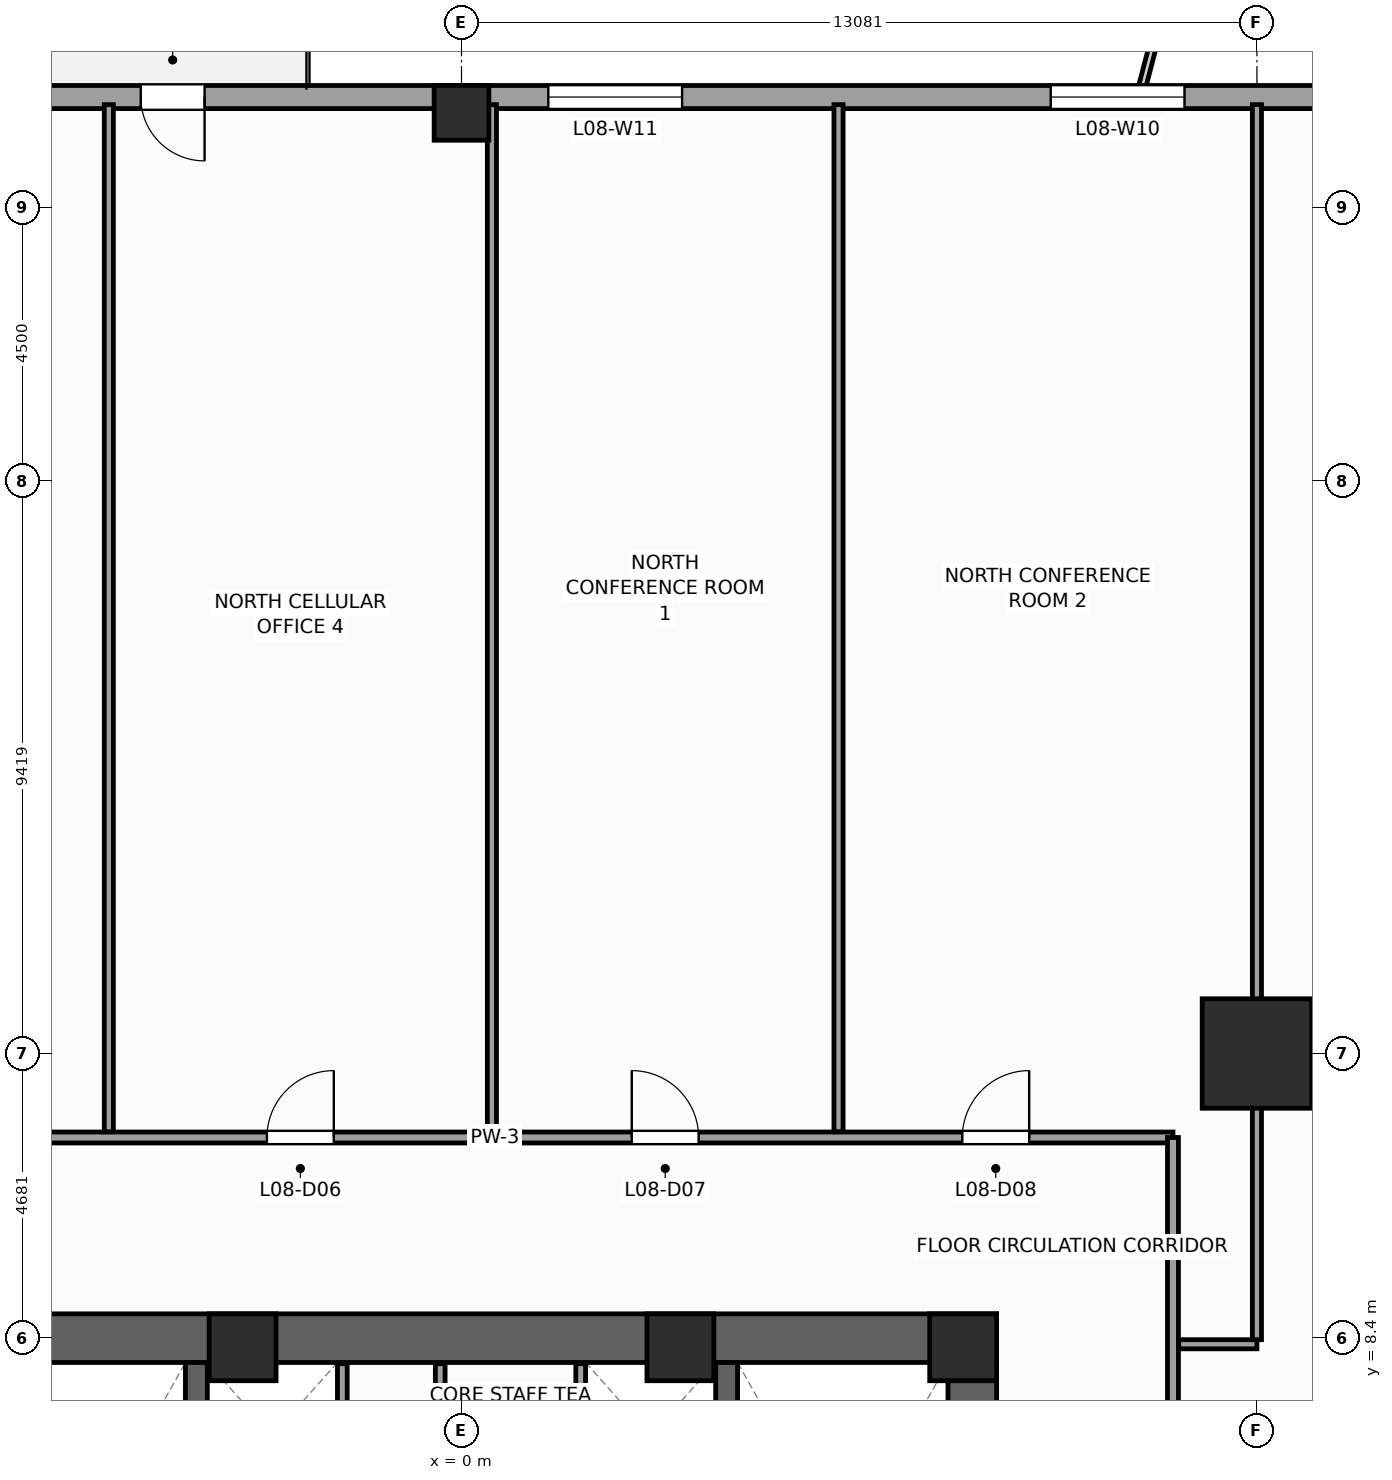
"""IFC4 building model, lengths in metres.
Left out: names, types, materials, properties, quantities, classifications, styles, units other than length and angle.
Written with IfcOpenShell. Run it as: python <this file> out.ifc"""

import sys

from ifc_helpers import new_model, si_unit, direction, frame, frame_2d, origin, origin_2d, place, context, subcontext, project, spatial, rectangle, extrude, source, transform, mapped, element, fill, save


model = new_model("IFC4")
c1 = context("Model", 3, precision=1e-05, world=origin(), true_north=direction((0.0, 1.0)))
c2 = subcontext(c1, "Body", "Model", "MODEL_VIEW")
j1 = project(units=[si_unit("LENGTHUNIT", "METRE"), si_unit("PLANEANGLEUNIT", "RADIAN")], contexts=[c1])
p1 = place(None, origin())
s1 = spatial("IfcSite", under=j1, at=p1, CompositionType="ELEMENT")
p2 = place(p1, origin())
s2 = spatial("IfcBuilding", under=s1, at=p2, CompositionType="ELEMENT")
p3 = place(p2, frame((0.0, 0.0, 38.0)))
s3 = spatial("IfcBuildingStorey", under=s2, at=p3, CompositionType="ELEMENT", Elevation=38.0)
p4 = place(p3, frame((-8.8, 8.4, 0.0), z_axis=(0.0, 0.0, 1.0), x_axis=(1.0, 0.0, 0.0)))
e1 = element("IfcWall", 1, at=p4, inside=s3, PredefinedType="SHEAR", context=c2, shape_type="SweptSolid", body=[
    extrude(rectangle(XDim=17.6, YDim=0.8, at=frame_2d((8.8, 0.0))), origin(), (0.0, 0.0, 1.0), 4.0),
])
p5 = place(p3, frame((8.4, -8.0, 0.0), z_axis=(0.0, 0.0, 1.0), x_axis=(0.0, 1.0, 0.0)))
e2 = element("IfcWall", 2, at=p5, inside=s3, PredefinedType="SHEAR", context=c2, shape_type="SweptSolid", body=[
    extrude(rectangle(XDim=16.0, YDim=0.8, at=frame_2d((8.0, 0.0))), origin(), (0.0, 0.0, 1.0), 4.0),
])
p6 = place(p5, frame((4.69, 0.0, 0.0)))
e3 = element("IfcOpeningElement", 3, at=p6, cuts=e2, PredefinedType="OPENING", context=c2, shape_type="SweptSolid", body=[
    extrude(rectangle(XDim=1.3, YDim=2.2, at=frame_2d((0.65, 1.1))), frame((0.0, 0.41, 0.0), z_axis=(0.0, -1.0, 0.0), x_axis=(1.0, 0.0, 0.0)), (0.0, 0.0, 1.0), 0.82),
])
for number, where, z_axis, x_axis in (
    (4, (-4.36, -8.0, 0.0), (0.0, 0.0, 1.0), (0.0, 1.0, 0.0)),
    (5, (4.36, -8.0, 0.0), (0.0, 0.0, 1.0), (0.0, 1.0, 0.0)),
):
    element("IfcWall", number, at=place(p3, frame(where, z_axis=z_axis, x_axis=x_axis)), inside=s3, PredefinedType="SHEAR", context=c2, shape_type="SweptSolid", body=[
        extrude(rectangle(XDim=16.0, YDim=0.36, at=frame_2d((8.0, 0.0))), origin(), (0.0, 0.0, 1.0), 4.0),
    ])
m1 = source(origin(), c2, "Body", "SweptSolid", [
    extrude(rectangle(XDim=1.1, YDim=1.1, at=origin_2d()), origin(), (0.0, 0.0, 1.0), 4.0),
])
for number, where, z_axis, x_axis in (
    (6, (8.25, 8.25, 0.0), (0.0, 0.0, 1.0), (1.0, 0.0, 0.0)),
    (7, (-3.6, 8.25, 0.0), (0.0, 0.0, 1.0), (1.0, 0.0, 0.0)),
    (8, (3.6, 8.25, 0.0), (0.0, 0.0, 1.0), (1.0, 0.0, 0.0)),
):
    element("IfcColumn", number, at=place(p3, frame(where, z_axis=z_axis, x_axis=x_axis)), inside=s3, PredefinedType="PILASTER", context=c2, shape_type="MappedRepresentation", body=[
        mapped(m1, transform((0.0, 0.0, 0.0), scale=1.0)),
    ])
m2 = source(origin(), c2, "Body", "SweptSolid", [
    extrude(rectangle(XDim=1.8, YDim=1.8, at=origin_2d()), origin(), (0.0, 0.0, 1.0), 4.0),
])
p7 = place(p3, frame((13.081, 13.081, 0.0), z_axis=(0.0, 0.0, 1.0), x_axis=(1.0, 0.0, 0.0)))
e9 = element("IfcColumn", 9, at=p7, inside=s3, PredefinedType="COLUMN", context=c2, shape_type="MappedRepresentation", body=[
    mapped(m2, transform((0.0, 0.0, 0.0), scale=1.0)),
])
m3 = source(origin(), c2, "Body", "SweptSolid", [
    extrude(rectangle(XDim=0.9, YDim=0.9, at=origin_2d()), origin(), (0.0, 0.0, 1.0), 4.0),
])
p8 = place(p3, frame((0.0, 28.55, 0.0), z_axis=(0.0, 0.0, 1.0), x_axis=(1.0, 0.0, 0.0)))
e10 = element("IfcColumn", 10, at=p8, inside=s3, PredefinedType="COLUMN", context=c2, shape_type="MappedRepresentation", body=[
    mapped(m3, transform((0.0, 0.0, 0.0), scale=1.0)),
])
p9 = place(p3, frame((25.69, 28.81, 0.0), z_axis=(0.0, 0.0, 1.0), x_axis=(-1.0, 0.0, 0.0)))
e11 = element("IfcWall", 11, at=p9, inside=s3, PredefinedType="STANDARD", context=c2, shape_type="SweptSolid", body=[
    extrude(rectangle(XDim=51.38, YDim=0.38, at=frame_2d((25.69, 0.0))), origin(), (0.0, 0.0, 1.0), 3.12),
])
p10 = place(p9, frame((29.915, 0.0, 0.0)))
e12 = element("IfcOpeningElement", 12, at=p10, cuts=e11, PredefinedType="OPENING", context=c2, shape_type="SweptSolid", body=[
    extrude(rectangle(XDim=1.05, YDim=2.25, at=frame_2d((0.525, 1.125))), frame((0.0, 0.2, 0.0), z_axis=(0.0, -1.0, 0.0), x_axis=(1.0, 0.0, 0.0)), (0.0, 0.0, 1.0), 0.4),
])
p11 = place(p9, frame((5.466, 0.0, 0.49)))
e13 = element("IfcOpeningElement", 13, at=p11, cuts=e11, PredefinedType="OPENING", context=c2, shape_type="SweptSolid", body=[
    extrude(rectangle(XDim=1.4, YDim=2.4, at=frame_2d((0.7, 1.2))), frame((0.0, 0.2, 0.0), z_axis=(0.0, -1.0, 0.0), x_axis=(1.0, 0.0, 0.0)), (0.0, 0.0, 1.0), 0.4),
])
p12 = place(p9, frame((13.8, 0.0, 0.49)))
e14 = element("IfcOpeningElement", 14, at=p12, cuts=e11, PredefinedType="OPENING", context=c2, shape_type="SweptSolid", body=[
    extrude(rectangle(XDim=2.2, YDim=2.4, at=frame_2d((1.1, 1.2))), frame((0.0, 0.2, 0.0), z_axis=(0.0, -1.0, 0.0), x_axis=(1.0, 0.0, 0.0)), (0.0, 0.0, 1.0), 0.4),
])
p13 = place(p9, frame((22.062, 0.0, 0.49)))
e15 = element("IfcOpeningElement", 15, at=p13, cuts=e11, PredefinedType="OPENING", context=c2, shape_type="SweptSolid", body=[
    extrude(rectangle(XDim=2.2, YDim=2.4, at=frame_2d((1.1, 1.2))), frame((0.0, 0.2, 0.0), z_axis=(0.0, -1.0, 0.0), x_axis=(1.0, 0.0, 0.0)), (0.0, 0.0, 1.0), 0.4),
])
p14 = place(p9, frame((33.838, 0.0, 0.49)))
e16 = element("IfcOpeningElement", 16, at=p14, cuts=e11, PredefinedType="OPENING", context=c2, shape_type="SweptSolid", body=[
    extrude(rectangle(XDim=2.2, YDim=2.4, at=frame_2d((1.1, 1.2))), frame((0.0, 0.2, 0.0), z_axis=(0.0, -1.0, 0.0), x_axis=(1.0, 0.0, 0.0)), (0.0, 0.0, 1.0), 0.4),
])
p15 = place(p9, frame((43.487, 0.0, 0.49)))
e17 = element("IfcOpeningElement", 17, at=p15, cuts=e11, PredefinedType="OPENING", context=c2, shape_type="SweptSolid", body=[
    extrude(rectangle(XDim=1.4, YDim=2.4, at=frame_2d((0.7, 1.2))), frame((0.0, 0.2, 0.0), z_axis=(0.0, -1.0, 0.0), x_axis=(1.0, 0.0, 0.0)), (0.0, 0.0, 1.0), 0.4),
])
for number, where, z_axis, x_axis in (
    (18, (-1.96, 4.58, 0.0), (0.0, 0.0, 1.0), (0.0, 1.0, 0.0)),
    (19, (1.96, 4.58, 0.0), (0.0, 0.0, 1.0), (0.0, 1.0, 0.0)),
):
    element("IfcWall", number, at=place(p3, frame(where, z_axis=z_axis, x_axis=x_axis)), inside=s3, PredefinedType="PARTITIONING", context=c2, shape_type="SweptSolid", body=[
        extrude(rectangle(XDim=3.4, YDim=0.16, at=frame_2d((1.7, 0.0))), origin(), (0.0, 0.0, 1.0), 3.72),
    ])
p16 = place(p3, frame((-0.35, 4.6, 0.0), z_axis=(0.0, 0.0, 1.0), x_axis=(0.0, 1.0, 0.0)))
e20 = element("IfcWall", 20, at=p16, inside=s3, PredefinedType="PARTITIONING", context=c2, shape_type="SweptSolid", body=[
    extrude(rectangle(XDim=3.38, YDim=0.16, at=frame_2d((1.69, 0.0))), origin(), (0.0, 0.0, 1.0), 3.72),
])
p17 = place(p3, frame((-10.6, 11.7, 0.0), z_axis=(0.0, 0.0, 1.0), x_axis=(1.0, 0.0, 0.0)))
e21 = element("IfcWall", 21, at=p17, inside=s3, PredefinedType="PARTITIONING", context=c2, shape_type="SweptSolid", body=[
    extrude(rectangle(XDim=22.3, YDim=0.18, at=frame_2d((11.15, 0.0))), origin(), (0.0, 0.0, 1.0), 3.72),
])
p18 = place(p17, frame((2.014, 0.0, 0.0)))
e22 = element("IfcOpeningElement", 22, at=p18, cuts=e21, PredefinedType="OPENING", context=c2, shape_type="SweptSolid", body=[
    extrude(rectangle(XDim=1.1, YDim=2.2, at=frame_2d((0.55, 1.1))), frame((0.0, 0.1, 0.0), z_axis=(0.0, -1.0, 0.0), x_axis=(1.0, 0.0, 0.0)), (0.0, 0.0, 1.0), 0.2),
])
p19 = place(p17, frame((7.4, 0.0, 0.0)))
e23 = element("IfcOpeningElement", 23, at=p19, cuts=e21, PredefinedType="OPENING", context=c2, shape_type="SweptSolid", body=[
    extrude(rectangle(XDim=1.1, YDim=2.2, at=frame_2d((0.55, 1.1))), frame((0.0, 0.1, 0.0), z_axis=(0.0, -1.0, 0.0), x_axis=(1.0, 0.0, 0.0)), (0.0, 0.0, 1.0), 0.2),
])
p20 = place(p17, frame((13.4, 0.0, 0.0)))
e24 = element("IfcOpeningElement", 24, at=p20, cuts=e21, PredefinedType="OPENING", context=c2, shape_type="SweptSolid", body=[
    extrude(rectangle(XDim=1.1, YDim=2.2, at=frame_2d((0.55, 1.1))), frame((0.0, 0.1, 0.0), z_axis=(0.0, -1.0, 0.0), x_axis=(1.0, 0.0, 0.0)), (0.0, 0.0, 1.0), 0.2),
])
p21 = place(p17, frame((18.835, 0.0, 0.0)))
e25 = element("IfcOpeningElement", 25, at=p21, cuts=e21, PredefinedType="OPENING", context=c2, shape_type="SweptSolid", body=[
    extrude(rectangle(XDim=1.1, YDim=2.2, at=frame_2d((0.55, 1.1))), frame((0.0, 0.1, 0.0), z_axis=(0.0, -1.0, 0.0), x_axis=(1.0, 0.0, 0.0)), (0.0, 0.0, 1.0), 0.2),
])
p22 = place(p3, frame((11.7, -0.95, 0.0), z_axis=(0.0, 0.0, 1.0), x_axis=(0.0, 1.0, 0.0)))
e26 = element("IfcWall", 26, at=p22, inside=s3, PredefinedType="PARTITIONING", context=c2, shape_type="SweptSolid", body=[
    extrude(rectangle(XDim=12.65, YDim=0.18, at=frame_2d((6.325, 0.0))), origin(), (0.0, 0.0, 1.0), 3.72),
])
p23 = place(p22, frame((6.387, 0.0, 0.0)))
e27 = element("IfcOpeningElement", 27, at=p23, cuts=e26, PredefinedType="OPENING", context=c2, shape_type="SweptSolid", body=[
    extrude(rectangle(XDim=1.1, YDim=2.2, at=frame_2d((0.55, 1.1))), frame((0.0, 0.1, 0.0), z_axis=(0.0, -1.0, 0.0), x_axis=(1.0, 0.0, 0.0)), (0.0, 0.0, 1.0), 0.2),
])
for number, where, z_axis, x_axis in (
    (28, (-5.8, 11.795, 0.0), (0.0, 0.0, 1.0), (0.0, 1.0, 0.0)),
    (29, (0.5, 11.795, 0.0), (0.0, 0.0, 1.0), (0.0, 1.0, 0.0)),
    (30, (6.2, 11.795, 0.0), (0.0, 0.0, 1.0), (0.0, 1.0, 0.0)),
):
    element("IfcWall", number, at=place(p3, frame(where, z_axis=z_axis, x_axis=x_axis)), inside=s3, PredefinedType="PARTITIONING", context=c2, shape_type="SweptSolid", body=[
        extrude(rectangle(XDim=16.89, YDim=0.15, at=frame_2d((8.445, 0.0))), origin(), (0.0, 0.0, 1.0), 3.72),
    ])
p24 = place(p3, frame((11.795, 8.3, 0.0), z_axis=(0.0, 0.0, 1.0), x_axis=(1.0, 0.0, 0.0)))
e31 = element("IfcWall", 31, at=p24, inside=s3, PredefinedType="PARTITIONING", context=c2, shape_type="SweptSolid", body=[
    extrude(rectangle(XDim=1.286, YDim=0.15, at=frame_2d((0.643, 0.0))), origin(), (0.0, 0.0, 1.0), 3.72),
])
p25 = place(p3, frame((13.081, 8.375, 0.0), z_axis=(0.0, 0.0, 1.0), x_axis=(0.0, 1.0, 0.0)))
e32 = element("IfcWall", 32, at=p25, inside=s3, PredefinedType="PARTITIONING", context=c2, shape_type="SweptSolid", body=[
    extrude(rectangle(XDim=20.31, YDim=0.15, at=frame_2d((10.155, 0.0))), origin(), (0.0, 0.0, 1.0), 2.712),
])
m4 = source(origin(), c2, "Body", "SweptSolid", [
    extrude(rectangle(XDim=1.05, YDim=2.25, at=frame_2d((0.525, 1.125))), frame((0.0, 0.025, 0.0), z_axis=(0.0, -1.0, 0.0), x_axis=(1.0, 0.0, 0.0)), (0.0, 0.0, 1.0), 0.05),
])
p26 = place(p10, origin())
e33 = element("IfcDoor", 33, at=p26, inside=s3, OperationType="SINGLE_SWING_LEFT", PredefinedType="DOOR", context=c2, shape_type="MappedRepresentation", body=[
    mapped(m4, transform((0.0, 0.0, 0.0), scale=1.0)),
])
fill(e12, e33)
m5 = source(origin(), c2, "Body", "SweptSolid", [
    extrude(rectangle(XDim=2.2, YDim=2.4, at=frame_2d((1.1, 1.2))), frame((0.0, 0.03, 0.0), z_axis=(0.0, -1.0, 0.0), x_axis=(1.0, 0.0, 0.0)), (0.0, 0.0, 1.0), 0.06),
])
p27 = place(p12, origin())
e34 = element("IfcWindow", 34, at=p27, inside=s3, PartitioningType="SINGLE_PANEL", PredefinedType="WINDOW", context=c2, shape_type="MappedRepresentation", body=[
    mapped(m5, transform((0.0, 0.0, 0.0), scale=1.0)),
])
fill(e14, e34)
p28 = place(p13, origin())
e35 = element("IfcWindow", 35, at=p28, inside=s3, PartitioningType="SINGLE_PANEL", PredefinedType="WINDOW", context=c2, shape_type="MappedRepresentation", body=[
    mapped(m5, transform((0.0, 0.0, 0.0), scale=1.0)),
])
fill(e15, e35)
m6 = source(origin(), c2, "Body", "SweptSolid", [
    extrude(rectangle(XDim=1.1, YDim=2.2, at=frame_2d((0.55, 1.1))), frame((0.0, 0.025, 0.0), z_axis=(0.0, -1.0, 0.0), x_axis=(1.0, 0.0, 0.0)), (0.0, 0.0, 1.0), 0.05),
])
p29 = place(p19, origin())
e36 = element("IfcDoor", 36, at=p29, inside=s3, OperationType="SINGLE_SWING_RIGHT", PredefinedType="DOOR", context=c2, shape_type="MappedRepresentation", body=[
    mapped(m6, transform((0.0, 0.0, 0.0), scale=1.0)),
])
fill(e23, e36)
p30 = place(p20, origin())
e37 = element("IfcDoor", 37, at=p30, inside=s3, OperationType="SINGLE_SWING_LEFT", PredefinedType="DOOR", context=c2, shape_type="MappedRepresentation", body=[
    mapped(m6, transform((0.0, 0.0, 0.0), scale=1.0)),
])
fill(e24, e37)
p31 = place(p21, origin())
e38 = element("IfcDoor", 38, at=p31, inside=s3, OperationType="SINGLE_SWING_RIGHT", PredefinedType="DOOR", context=c2, shape_type="MappedRepresentation", body=[
    mapped(m6, transform((0.0, 0.0, 0.0), scale=1.0)),
])
fill(e25, e38)
save(model, sys.argv[1])
